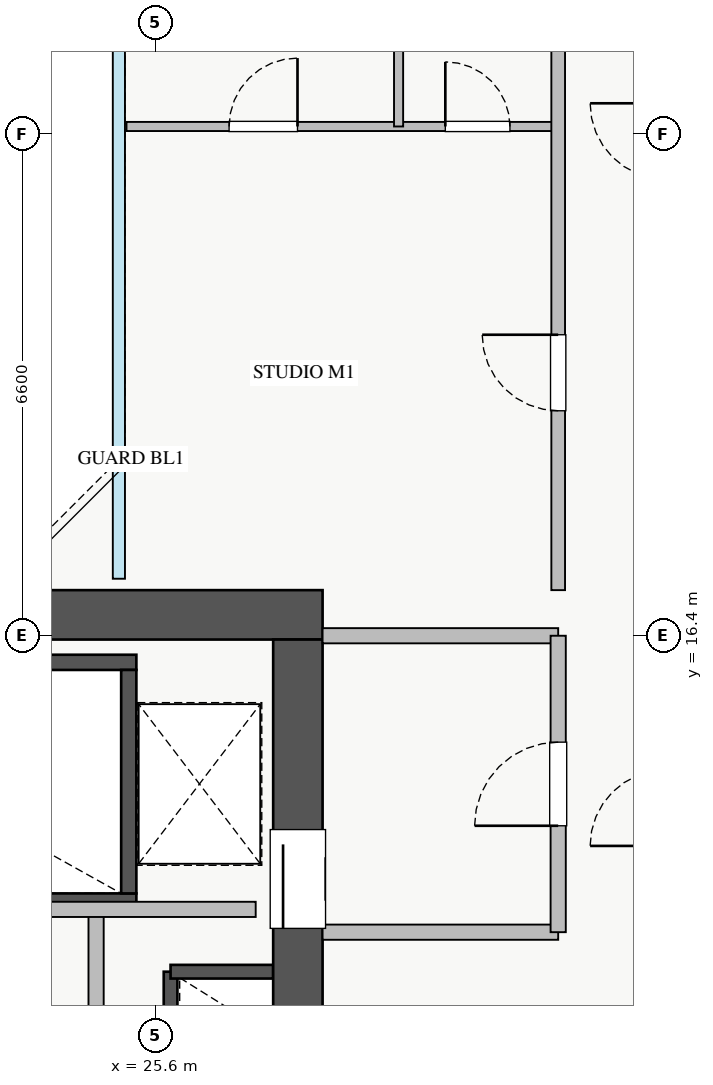
"""IFC4 building model, lengths in metres.
Left out: names, types, materials, properties, quantities, classifications, styles, units other than length and angle.
Written with IfcOpenShell. Run it as: python <this file> out.ifc"""

import sys

from ifc_helpers import new_model, si_unit, direction, frame, frame_2d, origin, place, context, subcontext, project, spatial, rectangle, extrude, source, transform, mapped, element, fill, save


model = new_model("IFC4")
c1 = context("Model", 3, precision=1e-05, world=origin(), true_north=direction((0.0, 1.0)))
c2 = subcontext(c1, "Body", "Model", "MODEL_VIEW")
j1 = project(units=[si_unit("LENGTHUNIT", "METRE"), si_unit("PLANEANGLEUNIT", "RADIAN")], contexts=[c1])
p1 = place(None, origin())
s1 = spatial("IfcSite", under=j1, at=p1, CompositionType="ELEMENT")
p2 = place(p1, origin())
s2 = spatial("IfcBuilding", under=s1, at=p2, CompositionType="ELEMENT")
p3 = place(p2, frame((0.0, 0.0, 173.0)))
s3 = spatial("IfcBuildingStorey", under=s2, at=p3, CompositionType="ELEMENT", Elevation=173.0)
p4 = place(p3, frame((25.8, 10.92, 0.0), z_axis=(0.0, 0.0, 1.0), x_axis=(0.0, 1.0, 0.0)))
e1 = element("IfcWall", 1, at=p4, inside=s3, PredefinedType="SHEAR", context=c2, shape_type="SweptSolid", body=[
    extrude(rectangle(XDim=1.06, YDim=0.18, at=frame_2d((0.53, 0.0))), origin(), (0.0, 0.0, 1.0), 3.0),
])
p5 = place(p3, frame((25.8, 11.98, 0.0), z_axis=(0.0, 0.0, 1.0), x_axis=(1.0, 0.0, 0.0)))
e2 = element("IfcWall", 2, at=p5, inside=s3, PredefinedType="SHEAR", context=c2, shape_type="SweptSolid", body=[
    extrude(rectangle(XDim=1.35, YDim=0.18, at=frame_2d((0.675, 0.0))), origin(), (0.0, 0.0, 1.0), 3.0),
])
p6 = place(p3, frame((18.2, 12.91, 0.0), z_axis=(0.0, 0.0, 1.0), x_axis=(1.0, 0.0, 0.0)))
e3 = element("IfcWall", 3, at=p6, inside=s3, PredefinedType="SHEAR", context=c2, shape_type="SweptSolid", body=[
    extrude(rectangle(XDim=7.15, YDim=0.2, at=frame_2d((3.575, 0.0))), origin(), (0.0, 0.0, 1.0), 3.25),
])
p7 = place(p6, frame((0.35, 0.0, 0.0)))
e4 = element("IfcOpeningElement", 4, at=p7, cuts=e3, PredefinedType="OPENING", context=c2, shape_type="SweptSolid", body=[
    extrude(rectangle(XDim=1.1, YDim=2.05, at=frame_2d((0.55, 1.025))), frame((0.0, 0.11, 0.0), z_axis=(0.0, -1.0, 0.0), x_axis=(1.0, 0.0, 0.0)), (0.0, 0.0, 1.0), 0.22),
])
p8 = place(p3, frame((18.2, 16.05, 0.0), z_axis=(0.0, 0.0, 1.0), x_axis=(1.0, 0.0, 0.0)))
e5 = element("IfcWall", 5, at=p8, inside=s3, PredefinedType="SHEAR", context=c2, shape_type="SweptSolid", body=[
    extrude(rectangle(XDim=7.15, YDim=0.2, at=frame_2d((3.575, 0.0))), origin(), (0.0, 0.0, 1.0), 3.25),
])
p9 = place(p3, frame((25.25, 13.01, 0.0), z_axis=(0.0, 0.0, 1.0), x_axis=(0.0, 1.0, 0.0)))
e6 = element("IfcWall", 6, at=p9, inside=s3, PredefinedType="SHEAR", context=c2, shape_type="SweptSolid", body=[
    extrude(rectangle(XDim=2.94, YDim=0.2, at=frame_2d((1.47, 0.0))), origin(), (0.0, 0.0, 1.0), 3.25),
])
p10 = place(p3, frame((10.2, 16.675, 0.0), z_axis=(0.0, 0.0, 1.0), x_axis=(1.0, 0.0, 0.0)))
e7 = element("IfcWall", 7, at=p10, inside=s3, PredefinedType="SHEAR", context=c2, shape_type="SweptSolid", body=[
    extrude(rectangle(XDim=17.6, YDim=0.65, at=frame_2d((8.8, 0.0))), origin(), (0.0, 0.0, 1.0), 3.25),
])
p11 = place(p3, frame((27.475, 10.45, 0.0), z_axis=(0.0, 0.0, 1.0), x_axis=(0.0, 1.0, 0.0)))
e8 = element("IfcWall", 8, at=p11, inside=s3, PredefinedType="SHEAR", context=c2, shape_type="SweptSolid", body=[
    extrude(rectangle(XDim=5.9, YDim=0.65, at=frame_2d((2.95, 0.0))), origin(), (0.0, 0.0, 1.0), 3.25),
])
p12 = place(p11, frame((2.1, 0.0, 0.0)))
e9 = element("IfcOpeningElement", 9, at=p12, cuts=e8, PredefinedType="OPENING", context=c2, shape_type="SweptSolid", body=[
    extrude(rectangle(XDim=1.3, YDim=2.05, at=frame_2d((0.65, 1.025))), frame((0.0, 0.335, 0.0), z_axis=(0.0, -1.0, 0.0), x_axis=(1.0, 0.0, 0.0)), (0.0, 0.0, 1.0), 0.67),
])
for number, where, z_axis, x_axis in (
    (10, (27.8, 16.4, 0.0), (0.0, 0.0, 1.0), (1.0, 0.0, 0.0)),
    (11, (27.8, 12.5, 0.0), (0.0, 0.0, 1.0), (1.0, 0.0, 0.0)),
):
    element("IfcWall", number, at=place(p3, frame(where, z_axis=z_axis, x_axis=x_axis)), inside=s3, PredefinedType="PARTITIONING", context=c2, shape_type="SweptSolid", body=[
        extrude(rectangle(XDim=3.1, YDim=0.2, at=frame_2d((1.55, 0.0))), origin(), (0.0, 0.0, 1.0), 3.0),
    ])
p13 = place(p3, frame((30.9, 12.5, 0.0), z_axis=(0.0, 0.0, 1.0), x_axis=(0.0, 1.0, 0.0)))
e12 = element("IfcWall", 12, at=p13, inside=s3, PredefinedType="PARTITIONING", context=c2, shape_type="SweptSolid", body=[
    extrude(rectangle(XDim=3.9, YDim=0.2, at=frame_2d((1.95, 0.0))), origin(), (0.0, 0.0, 1.0), 3.0),
])
p14 = place(p13, frame((1.4, 0.0, 0.0)))
e13 = element("IfcOpeningElement", 13, at=p14, cuts=e12, PredefinedType="OPENING", context=c2, shape_type="SweptSolid", body=[
    extrude(rectangle(XDim=1.1, YDim=2.05, at=frame_2d((0.55, 1.025))), frame((0.0, 0.11, 0.0), z_axis=(0.0, -1.0, 0.0), x_axis=(1.0, 0.0, 0.0)), (0.0, 0.0, 1.0), 0.22),
])
p15 = place(p3, frame((24.82, 10.15, 0.0), z_axis=(0.0, 0.0, 1.0), x_axis=(0.0, 1.0, 0.0)))
e14 = element("IfcWall", 14, at=p15, inside=s3, PredefinedType="PARTITIONING", context=c2, shape_type="SweptSolid", body=[
    extrude(rectangle(XDim=2.65, YDim=0.2, at=frame_2d((1.325, 0.0))), origin(), (0.0, 0.0, 1.0), 3.0),
])
p16 = place(p3, frame((21.75, 12.8, 0.0), z_axis=(0.0, 0.0, 1.0), x_axis=(1.0, 0.0, 0.0)))
e15 = element("IfcWall", 15, at=p16, inside=s3, PredefinedType="PARTITIONING", context=c2, shape_type="SweptSolid", body=[
    extrude(rectangle(XDim=5.17, YDim=0.2, at=frame_2d((2.585, 0.0))), origin(), (0.0, 0.0, 1.0), 3.0),
])
p17 = place(p3, frame((25.22, 23.1, 0.0), z_axis=(0.0, 0.0, 1.0), x_axis=(1.0, 0.0, 0.0)))
e16 = element("IfcWall", 16, at=p17, inside=s3, PredefinedType="PLUMBINGWALL", context=c2, shape_type="SweptSolid", body=[
    extrude(rectangle(XDim=5.68, YDim=0.12, at=frame_2d((2.84, 0.0))), origin(), (0.0, 0.0, 1.0), 3.0),
])
p18 = place(p17, frame((1.35, 0.0, 0.0)))
e17 = element("IfcOpeningElement", 17, at=p18, cuts=e16, PredefinedType="OPENING", context=c2, shape_type="SweptSolid", body=[
    extrude(rectangle(XDim=0.9, YDim=2.05, at=frame_2d((0.45, 1.025))), frame((0.0, 0.07, 0.0), z_axis=(0.0, -1.0, 0.0), x_axis=(1.0, 0.0, 0.0)), (0.0, 0.0, 1.0), 0.14),
])
p19 = place(p17, frame((4.195, 0.0, 0.0)))
e18 = element("IfcOpeningElement", 18, at=p19, cuts=e16, PredefinedType="OPENING", context=c2, shape_type="SweptSolid", body=[
    extrude(rectangle(XDim=0.85, YDim=2.05, at=frame_2d((0.425, 1.025))), frame((0.0, 0.07, 0.0), z_axis=(0.0, -1.0, 0.0), x_axis=(1.0, 0.0, 0.0)), (0.0, 0.0, 1.0), 0.14),
])
p20 = place(p3, frame((28.8, 23.1, 0.0), z_axis=(0.0, 0.0, 1.0), x_axis=(0.0, 1.0, 0.0)))
e19 = element("IfcWall", 19, at=p20, inside=s3, PredefinedType="PLUMBINGWALL", context=c2, shape_type="SweptSolid", body=[
    extrude(rectangle(XDim=5.9, YDim=0.12, at=frame_2d((2.95, 0.0))), origin(), (0.0, 0.0, 1.0), 3.0),
])
p21 = place(p3, frame((30.9, 17.0, 0.0), z_axis=(0.0, 0.0, 1.0), x_axis=(0.0, 1.0, 0.0)))
e20 = element("IfcWall", 20, at=p21, inside=s3, PredefinedType="PARTITIONING", context=c2, shape_type="SweptSolid", body=[
    extrude(rectangle(XDim=12.0, YDim=0.18, at=frame_2d((6.0, 0.0))), origin(), (0.0, 0.0, 1.0), 3.0),
])
p22 = place(p21, frame((2.36, 0.0, 0.0)))
e21 = element("IfcOpeningElement", 21, at=p22, cuts=e20, PredefinedType="OPENING", context=c2, shape_type="SweptSolid", body=[
    extrude(rectangle(XDim=1.0, YDim=2.05, at=frame_2d((0.5, 1.025))), frame((0.0, 0.1, 0.0), z_axis=(0.0, -1.0, 0.0), x_axis=(1.0, 0.0, 0.0)), (0.0, 0.0, 1.0), 0.2),
])
m1 = source(origin(), c2, "Body", "SweptSolid", [
    extrude(rectangle(XDim=1.3, YDim=2.05, at=frame_2d((0.65, 1.025))), frame((0.0, 0.025, 0.0), z_axis=(0.0, -1.0, 0.0), x_axis=(1.0, 0.0, 0.0)), (0.0, 0.0, 1.0), 0.05),
])
p23 = place(p12, origin())
e22 = element("IfcDoor", 22, at=p23, inside=s3, OperationType="SLIDING_TO_RIGHT", PredefinedType="DOOR", context=c2, shape_type="MappedRepresentation", body=[
    mapped(m1, transform((0.0, 0.0, 0.0), x_axis=(1.0, 0.0, 0.0), y_axis=(0.0, 1.0, 0.0), z_axis=(0.0, 0.0, 1.0), scale=1.0)),
])
fill(e9, e22)
m2 = source(origin(), c2, "Body", "SweptSolid", [
    extrude(rectangle(XDim=1.1, YDim=2.05, at=frame_2d((0.55, 1.025))), frame((0.0, 0.025, 0.0), z_axis=(0.0, -1.0, 0.0), x_axis=(1.0, 0.0, 0.0)), (0.0, 0.0, 1.0), 0.05),
])
p24 = place(p14, origin())
e23 = element("IfcDoor", 23, at=p24, inside=s3, OperationType="SINGLE_SWING_LEFT", PredefinedType="DOOR", context=c2, shape_type="MappedRepresentation", body=[
    mapped(m2, transform((0.0, 0.0, 0.0), x_axis=(1.0, 0.0, 0.0), y_axis=(0.0, 1.0, 0.0), z_axis=(0.0, 0.0, 1.0), scale=1.0)),
])
fill(e13, e23)
m3 = source(origin(), c2, "Body", "SweptSolid", [
    extrude(rectangle(XDim=0.9, YDim=2.05, at=frame_2d((0.45, 1.025))), frame((0.0, 0.025, 0.0), z_axis=(0.0, -1.0, 0.0), x_axis=(1.0, 0.0, 0.0)), (0.0, 0.0, 1.0), 0.05),
])
p25 = place(p18, origin())
e24 = element("IfcDoor", 24, at=p25, inside=s3, OperationType="SINGLE_SWING_RIGHT", PredefinedType="DOOR", context=c2, shape_type="MappedRepresentation", body=[
    mapped(m3, transform((0.0, 0.0, 0.0), x_axis=(1.0, 0.0, 0.0), y_axis=(0.0, 1.0, 0.0), z_axis=(0.0, 0.0, 1.0), scale=1.0)),
])
fill(e17, e24)
m4 = source(origin(), c2, "Body", "SweptSolid", [
    extrude(rectangle(XDim=0.85, YDim=2.05, at=frame_2d((0.425, 1.025))), frame((0.0, 0.025, 0.0), z_axis=(0.0, -1.0, 0.0), x_axis=(1.0, 0.0, 0.0)), (0.0, 0.0, 1.0), 0.05),
])
p26 = place(p19, origin())
e25 = element("IfcDoor", 25, at=p26, inside=s3, OperationType="SINGLE_SWING_LEFT", PredefinedType="DOOR", context=c2, shape_type="MappedRepresentation", body=[
    mapped(m4, transform((0.0, 0.0, 0.0), x_axis=(1.0, 0.0, 0.0), y_axis=(0.0, 1.0, 0.0), z_axis=(0.0, 0.0, 1.0), scale=1.0)),
])
fill(e18, e25)
m5 = source(origin(), c2, "Body", "SweptSolid", [
    extrude(rectangle(XDim=1.0, YDim=2.05, at=frame_2d((0.5, 1.025))), frame((0.0, 0.025, 0.0), z_axis=(0.0, -1.0, 0.0), x_axis=(1.0, 0.0, 0.0)), (0.0, 0.0, 1.0), 0.05),
])
p27 = place(p22, origin())
e26 = element("IfcDoor", 26, at=p27, inside=s3, OperationType="SINGLE_SWING_RIGHT", PredefinedType="DOOR", context=c2, shape_type="MappedRepresentation", body=[
    mapped(m5, transform((0.0, 0.0, 0.0), x_axis=(1.0, 0.0, 0.0), y_axis=(0.0, 1.0, 0.0), z_axis=(0.0, 0.0, 1.0), scale=1.0)),
])
fill(e21, e26)
save(model, sys.argv[1])
